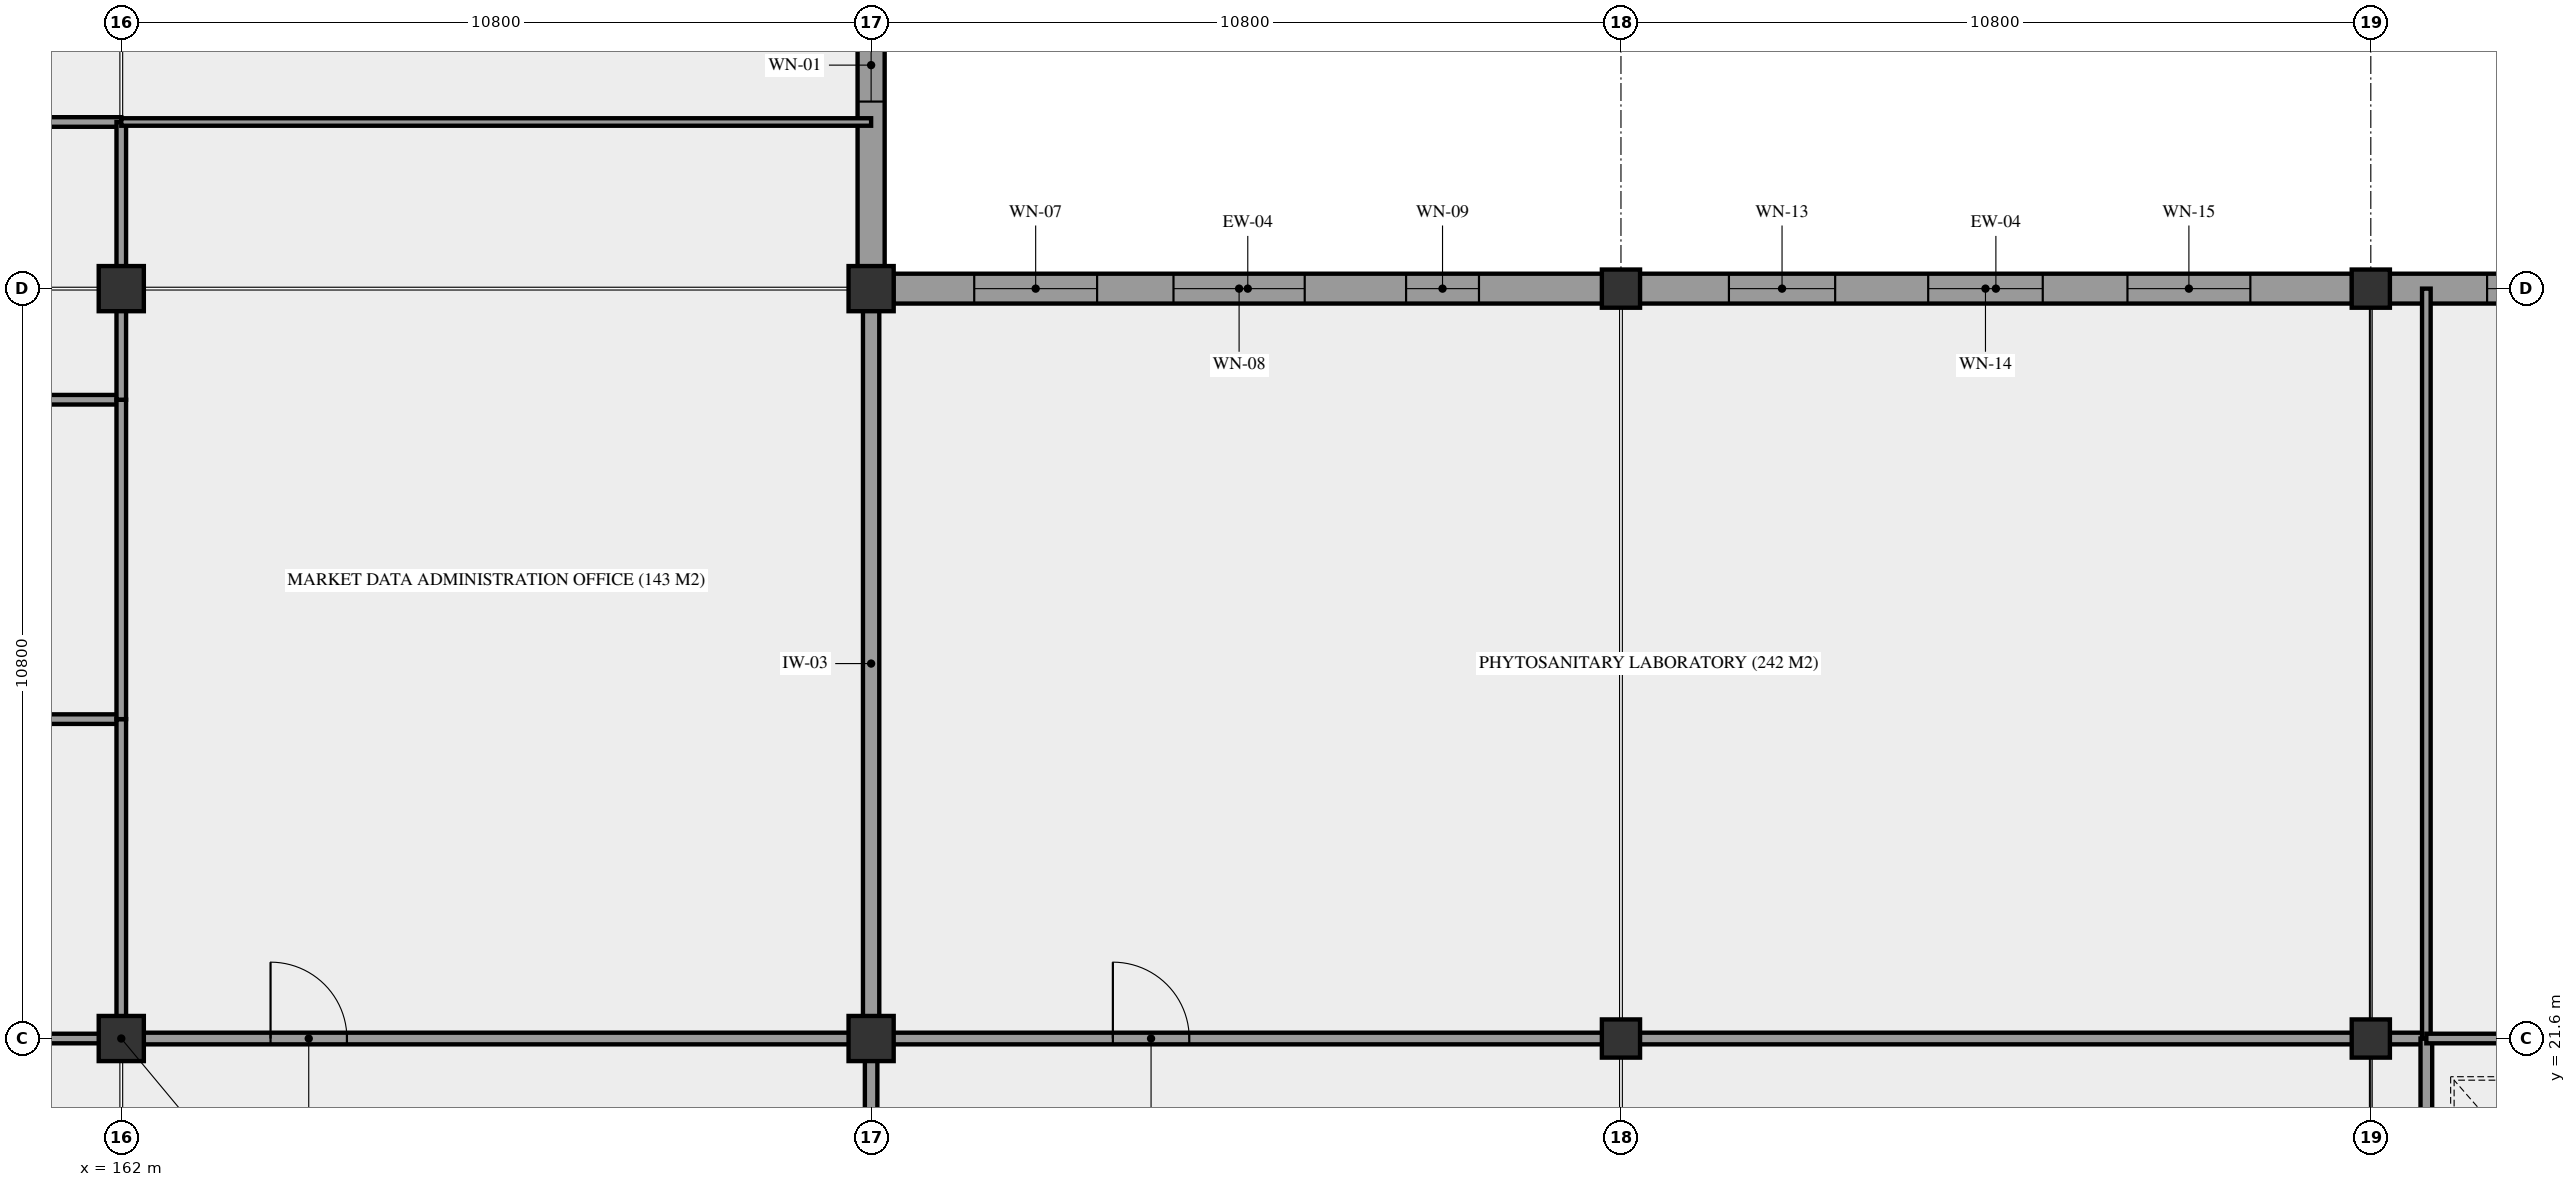
"""IFC4 building model, lengths in metres.
Left out: names, types, materials, properties, quantities, classifications, styles, units other than length and angle.
Written with IfcOpenShell. Run it as: python <this file> out.ifc"""

import sys

from ifc_helpers import new_model, si_unit, direction, frame, frame_2d, origin, origin_2d, place, context, subcontext, project, spatial, rectangle, extrude, element, fill, save


model = new_model("IFC4")
c1 = context("Model", 3, precision=1e-05, world=origin(), true_north=direction((0.0, 1.0)))
c2 = subcontext(c1, "Body", "Model", "MODEL_VIEW")
j1 = project(units=[si_unit("LENGTHUNIT", "METRE"), si_unit("PLANEANGLEUNIT", "RADIAN")], contexts=[c1])
p1 = place(None, origin())
s1 = spatial("IfcSite", under=j1, at=p1, CompositionType="ELEMENT")
p2 = place(p1, origin())
s2 = spatial("IfcBuilding", under=s1, at=p2, CompositionType="ELEMENT")
p3 = place(p2, frame((0.0, 0.0, 10.08)))
s3 = spatial("IfcBuildingStorey", under=s2, at=p3, CompositionType="ELEMENT", Elevation=10.08)
for number, where, z_axis, x_axis in (
    (1, (162.0, 21.6, 0.0), (0.0, 0.0, 1.0), (1.0, 0.0, 0.0)),
    (2, (162.0, 32.4, 0.0), (0.0, 0.0, 1.0), (1.0, 0.0, 0.0)),
    (3, (172.8, 21.6, 0.0), (0.0, 0.0, 1.0), (1.0, 0.0, 0.0)),
    (4, (172.8, 32.4, 0.0), (0.0, 0.0, 1.0), (1.0, 0.0, 0.0)),
):
    element("IfcColumn", number, at=place(p3, frame(where, z_axis=z_axis, x_axis=x_axis)), inside=s3, PredefinedType="COLUMN", context=c2, shape_type="SweptSolid", body=[
        extrude(rectangle(XDim=0.65, YDim=0.65, at=origin_2d()), origin(), (0.0, 0.0, 1.0), 4.68),
    ])
for number, where, z_axis, x_axis in (
    (5, (183.6, 21.6, 0.0), (0.0, 0.0, 1.0), (1.0, 0.0, 0.0)),
    (6, (183.6, 32.4, 0.0), (0.0, 0.0, 1.0), (1.0, 0.0, 0.0)),
    (7, (194.4, 21.6, 0.0), (0.0, 0.0, 1.0), (1.0, 0.0, 0.0)),
    (8, (194.4, 32.4, 0.0), (0.0, 0.0, 1.0), (1.0, 0.0, 0.0)),
):
    element("IfcColumn", number, at=place(p3, frame(where, z_axis=z_axis, x_axis=x_axis)), inside=s3, PredefinedType="COLUMN", context=c2, shape_type="SweptSolid", body=[
        extrude(rectangle(XDim=0.55, YDim=0.55, at=origin_2d()), origin(), (0.0, 0.0, 1.0), 4.68),
    ])
p4 = place(p3, frame((172.8, 32.72, 0.0), z_axis=(0.0, 0.0, 1.0), x_axis=(0.0, 1.0, 0.0)))
e9 = element("IfcWall", 9, at=p4, inside=s3, PredefinedType="STANDARD", context=c2, shape_type="SweptSolid", body=[
    extrude(rectangle(XDim=10.16, YDim=0.39, at=frame_2d((5.08, 0.0))), origin(), (0.0, 0.0, 1.0), 3.53),
])
p5 = place(p4, frame((2.374, 0.0, 0.95)))
e10 = element("IfcOpeningElement", 10, at=p5, cuts=e9, PredefinedType="OPENING", context=c2, shape_type="SweptSolid", body=[
    extrude(rectangle(XDim=1.05, YDim=0.9, at=frame_2d((0.525, 0.45))), frame((0.0, 0.205, 0.0), z_axis=(0.0, -1.0, 0.0), x_axis=(1.0, 0.0, 0.0)), (0.0, 0.0, 1.0), 0.41),
])
p6 = place(p4, frame((4.395, 0.0, 0.95)))
e11 = element("IfcOpeningElement", 11, at=p6, cuts=e9, PredefinedType="OPENING", context=c2, shape_type="SweptSolid", body=[
    extrude(rectangle(XDim=1.17, YDim=0.9, at=frame_2d((0.585, 0.45))), frame((0.0, 0.205, 0.0), z_axis=(0.0, -1.0, 0.0), x_axis=(1.0, 0.0, 0.0)), (0.0, 0.0, 1.0), 0.41),
])
p7 = place(p4, frame((7.265, 0.0, 0.95)))
e12 = element("IfcOpeningElement", 12, at=p7, cuts=e9, PredefinedType="OPENING", context=c2, shape_type="SweptSolid", body=[
    extrude(rectangle(XDim=1.29, YDim=0.9, at=frame_2d((0.645, 0.45))), frame((0.0, 0.205, 0.0), z_axis=(0.0, -1.0, 0.0), x_axis=(1.0, 0.0, 0.0)), (0.0, 0.0, 1.0), 0.41),
])
p8 = place(p3, frame((173.12, 32.4, 0.0), z_axis=(0.0, 0.0, 1.0), x_axis=(1.0, 0.0, 0.0)))
e13 = element("IfcWall", 13, at=p8, inside=s3, PredefinedType="STANDARD", context=c2, shape_type="SweptSolid", body=[
    extrude(rectangle(XDim=10.21, YDim=0.43, at=frame_2d((5.105, 0.0))), origin(), (0.0, 0.0, 1.0), 3.53),
])
p9 = place(p8, frame((1.165, 0.0, 0.95)))
e14 = element("IfcOpeningElement", 14, at=p9, cuts=e13, PredefinedType="OPENING", context=c2, shape_type="SweptSolid", body=[
    extrude(rectangle(XDim=1.77, YDim=0.9, at=frame_2d((0.885, 0.45))), frame((0.0, 0.225, 0.0), z_axis=(0.0, -1.0, 0.0), x_axis=(1.0, 0.0, 0.0)), (0.0, 0.0, 1.0), 0.45),
])
p10 = place(p8, frame((4.035, 0.0, 0.95)))
e15 = element("IfcOpeningElement", 15, at=p10, cuts=e13, PredefinedType="OPENING", context=c2, shape_type="SweptSolid", body=[
    extrude(rectangle(XDim=1.89, YDim=0.9, at=frame_2d((0.945, 0.45))), frame((0.0, 0.225, 0.0), z_axis=(0.0, -1.0, 0.0), x_axis=(1.0, 0.0, 0.0)), (0.0, 0.0, 1.0), 0.45),
])
p11 = place(p8, frame((7.385, 0.0, 0.95)))
e16 = element("IfcOpeningElement", 16, at=p11, cuts=e13, PredefinedType="OPENING", context=c2, shape_type="SweptSolid", body=[
    extrude(rectangle(XDim=1.05, YDim=1.05, at=frame_2d((0.525, 0.525))), frame((0.0, 0.225, 0.0), z_axis=(0.0, -1.0, 0.0), x_axis=(1.0, 0.0, 0.0)), (0.0, 0.0, 1.0), 0.45),
])
p12 = place(p3, frame((183.87, 32.4, 0.0), z_axis=(0.0, 0.0, 1.0), x_axis=(1.0, 0.0, 0.0)))
e17 = element("IfcWall", 17, at=p12, inside=s3, PredefinedType="STANDARD", context=c2, shape_type="SweptSolid", body=[
    extrude(rectangle(XDim=10.26, YDim=0.43, at=frame_2d((5.13, 0.0))), origin(), (0.0, 0.0, 1.0), 3.53),
])
p13 = place(p12, frame((1.285, 0.0, 0.95)))
e18 = element("IfcOpeningElement", 18, at=p13, cuts=e17, PredefinedType="OPENING", context=c2, shape_type="SweptSolid", body=[
    extrude(rectangle(XDim=1.53, YDim=1.05, at=frame_2d((0.765, 0.525))), frame((0.0, 0.225, 0.0), z_axis=(0.0, -1.0, 0.0), x_axis=(1.0, 0.0, 0.0)), (0.0, 0.0, 1.0), 0.45),
])
p14 = place(p12, frame((4.155, 0.0, 0.95)))
e19 = element("IfcOpeningElement", 19, at=p14, cuts=e17, PredefinedType="OPENING", context=c2, shape_type="SweptSolid", body=[
    extrude(rectangle(XDim=1.65, YDim=1.05, at=frame_2d((0.825, 0.525))), frame((0.0, 0.225, 0.0), z_axis=(0.0, -1.0, 0.0), x_axis=(1.0, 0.0, 0.0)), (0.0, 0.0, 1.0), 0.45),
])
p15 = place(p12, frame((7.025, 0.0, 0.95)))
e20 = element("IfcOpeningElement", 20, at=p15, cuts=e17, PredefinedType="OPENING", context=c2, shape_type="SweptSolid", body=[
    extrude(rectangle(XDim=1.77, YDim=1.05, at=frame_2d((0.885, 0.525))), frame((0.0, 0.225, 0.0), z_axis=(0.0, -1.0, 0.0), x_axis=(1.0, 0.0, 0.0)), (0.0, 0.0, 1.0), 0.45),
])
p16 = place(p3, frame((194.67, 32.4, 0.0), z_axis=(0.0, 0.0, 1.0), x_axis=(1.0, 0.0, 0.0)))
e21 = element("IfcWall", 21, at=p16, inside=s3, PredefinedType="STANDARD", context=c2, shape_type="SweptSolid", body=[
    extrude(rectangle(XDim=10.26, YDim=0.43, at=frame_2d((5.13, 0.0))), origin(), (0.0, 0.0, 1.0), 3.53),
])
p17 = place(p16, frame((1.405, 0.0, 0.95)))
e22 = element("IfcOpeningElement", 22, at=p17, cuts=e21, PredefinedType="OPENING", context=c2, shape_type="SweptSolid", body=[
    extrude(rectangle(XDim=1.29, YDim=1.2, at=frame_2d((0.645, 0.6))), frame((0.0, 0.225, 0.0), z_axis=(0.0, -1.0, 0.0), x_axis=(1.0, 0.0, 0.0)), (0.0, 0.0, 1.0), 0.45),
])
p18 = place(p16, frame((4.275, 0.0, 0.95)))
e23 = element("IfcOpeningElement", 23, at=p18, cuts=e21, PredefinedType="OPENING", context=c2, shape_type="SweptSolid", body=[
    extrude(rectangle(XDim=1.41, YDim=1.2, at=frame_2d((0.705, 0.6))), frame((0.0, 0.225, 0.0), z_axis=(0.0, -1.0, 0.0), x_axis=(1.0, 0.0, 0.0)), (0.0, 0.0, 1.0), 0.45),
])
p19 = place(p16, frame((7.145, 0.0, 0.95)))
e24 = element("IfcOpeningElement", 24, at=p19, cuts=e21, PredefinedType="OPENING", context=c2, shape_type="SweptSolid", body=[
    extrude(rectangle(XDim=1.53, YDim=1.2, at=frame_2d((0.765, 0.6))), frame((0.0, 0.225, 0.0), z_axis=(0.0, -1.0, 0.0), x_axis=(1.0, 0.0, 0.0)), (0.0, 0.0, 1.0), 0.45),
])
p20 = place(p3, frame((172.8, 17.2, 0.0), z_axis=(0.0, 0.0, 1.0), x_axis=(0.0, 1.0, 0.0)))
e25 = element("IfcWall", 25, at=p20, inside=s3, PredefinedType="PARTITIONING", context=c2, shape_type="SweptSolid", body=[
    extrude(rectangle(XDim=4.4, YDim=0.18, at=frame_2d((2.2, 0.0))), origin(), (0.0, 0.0, 1.0), 3.23),
])
p21 = place(p20, frame((0.3, 0.0, 0.0)))
e26 = element("IfcOpeningElement", 26, at=p21, cuts=e25, PredefinedType="OPENING", context=c2, shape_type="SweptSolid", body=[
    extrude(rectangle(XDim=1.6, YDim=2.2, at=frame_2d((0.8, 1.1))), frame((0.0, 0.1, 0.0), z_axis=(0.0, -1.0, 0.0), x_axis=(1.0, 0.0, 0.0)), (0.0, 0.0, 1.0), 0.2),
])
p22 = place(p3, frame((155.0, 21.6, 0.0), z_axis=(0.0, 0.0, 1.0), x_axis=(1.0, 0.0, 0.0)))
e27 = element("IfcWall", 27, at=p22, inside=s3, PredefinedType="PARTITIONING", context=c2, shape_type="SweptSolid", body=[
    extrude(rectangle(XDim=7.0, YDim=0.138, at=frame_2d((3.5, 0.0))), origin(), (0.0, 0.0, 1.0), 3.23),
])
p23 = place(p22, frame((0.38, 0.0, 0.0)))
e28 = element("IfcOpeningElement", 28, at=p23, cuts=e27, PredefinedType="OPENING", context=c2, shape_type="SweptSolid", body=[
    extrude(rectangle(XDim=0.92, YDim=2.14, at=frame_2d((0.46, 1.07))), frame((0.0, 0.079, 0.0), z_axis=(0.0, -1.0, 0.0), x_axis=(1.0, 0.0, 0.0)), (0.0, 0.0, 1.0), 0.158),
])
p24 = place(p3, frame((162.0, 21.6, 0.0), z_axis=(0.0, 0.0, 1.0), x_axis=(1.0, 0.0, 0.0)))
e29 = element("IfcWall", 29, at=p24, inside=s3, PredefinedType="PARTITIONING", context=c2, shape_type="SweptSolid", body=[
    extrude(rectangle(XDim=10.8, YDim=0.168, at=frame_2d((5.4, 0.0))), origin(), (0.0, 0.0, 1.0), 3.23),
])
p25 = place(p24, frame((2.15, 0.0, 0.0)))
e30 = element("IfcOpeningElement", 30, at=p25, cuts=e29, PredefinedType="OPENING", context=c2, shape_type="SweptSolid", body=[
    extrude(rectangle(XDim=1.1, YDim=2.2, at=frame_2d((0.55, 1.1))), frame((0.0, 0.094, 0.0), z_axis=(0.0, -1.0, 0.0), x_axis=(1.0, 0.0, 0.0)), (0.0, 0.0, 1.0), 0.188),
])
p26 = place(p3, frame((172.8, 21.6, 0.0), z_axis=(0.0, 0.0, 1.0), x_axis=(1.0, 0.0, 0.0)))
e31 = element("IfcWall", 31, at=p26, inside=s3, PredefinedType="PARTITIONING", context=c2, shape_type="SweptSolid", body=[
    extrude(rectangle(XDim=22.4, YDim=0.168, at=frame_2d((11.2, 0.0))), origin(), (0.0, 0.0, 1.0), 3.23),
])
p27 = place(p26, frame((3.482, 0.0, 0.0)))
e32 = element("IfcOpeningElement", 32, at=p27, cuts=e31, PredefinedType="OPENING", context=c2, shape_type="SweptSolid", body=[
    extrude(rectangle(XDim=1.1, YDim=2.2, at=frame_2d((0.55, 1.1))), frame((0.0, 0.094, 0.0), z_axis=(0.0, -1.0, 0.0), x_axis=(1.0, 0.0, 0.0)), (0.0, 0.0, 1.0), 0.188),
])
for number, where, z_axis, x_axis in (
    (33, (155.0, 26.2, 0.0), (0.0, 0.0, 1.0), (1.0, 0.0, 0.0)),
    (34, (155.0, 30.8, 0.0), (0.0, 0.0, 1.0), (1.0, 0.0, 0.0)),
    (35, (155.0, 34.8, 0.0), (0.0, 0.0, 1.0), (1.0, 0.0, 0.0)),
):
    element("IfcWall", number, at=place(p3, frame(where, z_axis=z_axis, x_axis=x_axis)), inside=s3, PredefinedType="PARTITIONING", context=c2, shape_type="SweptSolid", body=[
        extrude(rectangle(XDim=7.0, YDim=0.138, at=frame_2d((3.5, 0.0))), origin(), (0.0, 0.0, 1.0), 3.23),
    ])
p28 = place(p3, frame((162.0, 21.6, 0.0), z_axis=(0.0, 0.0, 1.0), x_axis=(0.0, 1.0, 0.0)))
e36 = element("IfcWall", 36, at=p28, inside=s3, PredefinedType="PARTITIONING", context=c2, shape_type="SweptSolid", body=[
    extrude(rectangle(XDim=4.6, YDim=0.138, at=frame_2d((2.3, 0.0))), origin(), (0.0, 0.0, 1.0), 3.23),
])
p29 = place(p3, frame((162.0, 26.2, 0.0), z_axis=(0.0, 0.0, 1.0), x_axis=(0.0, 1.0, 0.0)))
e37 = element("IfcWall", 37, at=p29, inside=s3, PredefinedType="PARTITIONING", context=c2, shape_type="SweptSolid", body=[
    extrude(rectangle(XDim=4.6, YDim=0.138, at=frame_2d((2.3, 0.0))), origin(), (0.0, 0.0, 1.0), 3.23),
])
p30 = place(p3, frame((162.0, 30.8, 0.0), z_axis=(0.0, 0.0, 1.0), x_axis=(0.0, 1.0, 0.0)))
e38 = element("IfcWall", 38, at=p30, inside=s3, PredefinedType="PARTITIONING", context=c2, shape_type="SweptSolid", body=[
    extrude(rectangle(XDim=4.0, YDim=0.138, at=frame_2d((2.0, 0.0))), origin(), (0.0, 0.0, 1.0), 3.23),
])
p31 = place(p3, frame((162.0, 34.8, 0.0), z_axis=(0.0, 0.0, 1.0), x_axis=(1.0, 0.0, 0.0)))
e39 = element("IfcWall", 39, at=p31, inside=s3, PredefinedType="PARTITIONING", context=c2, shape_type="SweptSolid", body=[
    extrude(rectangle(XDim=10.8, YDim=0.108, at=frame_2d((5.4, 0.0))), origin(), (0.0, 0.0, 1.0), 3.23),
])
p32 = place(p3, frame((172.8, 21.6, 0.0), z_axis=(0.0, 0.0, 1.0), x_axis=(0.0, 1.0, 0.0)))
e40 = element("IfcWall", 40, at=p32, inside=s3, PredefinedType="PARTITIONING", context=c2, shape_type="SweptSolid", body=[
    extrude(rectangle(XDim=10.8, YDim=0.235, at=frame_2d((5.4, 0.0))), origin(), (0.0, 0.0, 1.0), 3.23),
])
p33 = place(p3, frame((195.2, 17.2, 0.0), z_axis=(0.0, 0.0, 1.0), x_axis=(0.0, 1.0, 0.0)))
e41 = element("IfcWall", 41, at=p33, inside=s3, PredefinedType="PARTITIONING", context=c2, shape_type="SweptSolid", body=[
    extrude(rectangle(XDim=4.4, YDim=0.168, at=frame_2d((2.2, 0.0))), origin(), (0.0, 0.0, 1.0), 3.23),
])
p34 = place(p3, frame((195.2, 21.6, 0.0), z_axis=(0.0, 0.0, 1.0), x_axis=(0.0, 1.0, 0.0)))
e42 = element("IfcWall", 42, at=p34, inside=s3, PredefinedType="PARTITIONING", context=c2, shape_type="SweptSolid", body=[
    extrude(rectangle(XDim=10.8, YDim=0.124, at=frame_2d((5.4, 0.0))), origin(), (0.0, 0.0, 1.0), 3.23),
])
p35 = place(p3, frame((195.2, 21.6, 0.0), z_axis=(0.0, 0.0, 1.0), x_axis=(1.0, 0.0, 0.0)))
e43 = element("IfcWall", 43, at=p35, inside=s3, PredefinedType="PARTITIONING", context=c2, shape_type="SweptSolid", body=[
    extrude(rectangle(XDim=9.2, YDim=0.138, at=frame_2d((4.6, 0.0))), origin(), (0.0, 0.0, 1.0), 3.23),
])
p36 = place(p5, frame((1.05, 0.0, 0.0), z_axis=(0.0, 0.0, 1.0), x_axis=(-1.0, 0.0, 0.0)))
e44 = element("IfcWindow", 44, at=p36, inside=s3, PartitioningType="SINGLE_PANEL", PredefinedType="WINDOW", context=c2, shape_type="SweptSolid", body=[
    extrude(rectangle(XDim=1.05, YDim=0.9, at=frame_2d((0.525, 0.45))), frame((0.0, 0.03, 0.0), z_axis=(0.0, -1.0, 0.0), x_axis=(1.0, 0.0, 0.0)), (0.0, 0.0, 1.0), 0.06),
])
fill(e10, e44)
p37 = place(p9, origin())
e45 = element("IfcWindow", 45, at=p37, inside=s3, PartitioningType="SINGLE_PANEL", PredefinedType="WINDOW", context=c2, shape_type="SweptSolid", body=[
    extrude(rectangle(XDim=1.77, YDim=0.9, at=frame_2d((0.885, 0.45))), frame((0.0, 0.03, 0.0), z_axis=(0.0, -1.0, 0.0), x_axis=(1.0, 0.0, 0.0)), (0.0, 0.0, 1.0), 0.06),
])
fill(e14, e45)
p38 = place(p10, origin())
e46 = element("IfcWindow", 46, at=p38, inside=s3, PartitioningType="SINGLE_PANEL", PredefinedType="WINDOW", context=c2, shape_type="SweptSolid", body=[
    extrude(rectangle(XDim=1.89, YDim=0.9, at=frame_2d((0.945, 0.45))), frame((0.0, 0.03, 0.0), z_axis=(0.0, -1.0, 0.0), x_axis=(1.0, 0.0, 0.0)), (0.0, 0.0, 1.0), 0.06),
])
fill(e15, e46)
p39 = place(p11, origin())
e47 = element("IfcWindow", 47, at=p39, inside=s3, PartitioningType="SINGLE_PANEL", PredefinedType="WINDOW", context=c2, shape_type="SweptSolid", body=[
    extrude(rectangle(XDim=1.05, YDim=1.05, at=frame_2d((0.525, 0.525))), frame((0.0, 0.03, 0.0), z_axis=(0.0, -1.0, 0.0), x_axis=(1.0, 0.0, 0.0)), (0.0, 0.0, 1.0), 0.06),
])
fill(e16, e47)
p40 = place(p13, origin())
e48 = element("IfcWindow", 48, at=p40, inside=s3, PartitioningType="SINGLE_PANEL", PredefinedType="WINDOW", context=c2, shape_type="SweptSolid", body=[
    extrude(rectangle(XDim=1.53, YDim=1.05, at=frame_2d((0.765, 0.525))), frame((0.0, 0.03, 0.0), z_axis=(0.0, -1.0, 0.0), x_axis=(1.0, 0.0, 0.0)), (0.0, 0.0, 1.0), 0.06),
])
fill(e18, e48)
p41 = place(p14, origin())
e49 = element("IfcWindow", 49, at=p41, inside=s3, PartitioningType="SINGLE_PANEL", PredefinedType="WINDOW", context=c2, shape_type="SweptSolid", body=[
    extrude(rectangle(XDim=1.65, YDim=1.05, at=frame_2d((0.825, 0.525))), frame((0.0, 0.03, 0.0), z_axis=(0.0, -1.0, 0.0), x_axis=(1.0, 0.0, 0.0)), (0.0, 0.0, 1.0), 0.06),
])
fill(e19, e49)
p42 = place(p15, origin())
e50 = element("IfcWindow", 50, at=p42, inside=s3, PartitioningType="SINGLE_PANEL", PredefinedType="WINDOW", context=c2, shape_type="SweptSolid", body=[
    extrude(rectangle(XDim=1.77, YDim=1.05, at=frame_2d((0.885, 0.525))), frame((0.0, 0.03, 0.0), z_axis=(0.0, -1.0, 0.0), x_axis=(1.0, 0.0, 0.0)), (0.0, 0.0, 1.0), 0.06),
])
fill(e20, e50)
p43 = place(p17, origin())
e51 = element("IfcWindow", 51, at=p43, inside=s3, PartitioningType="SINGLE_PANEL", PredefinedType="WINDOW", context=c2, shape_type="SweptSolid", body=[
    extrude(rectangle(XDim=1.29, YDim=1.2, at=frame_2d((0.645, 0.6))), frame((0.0, 0.03, 0.0), z_axis=(0.0, -1.0, 0.0), x_axis=(1.0, 0.0, 0.0)), (0.0, 0.0, 1.0), 0.06),
])
fill(e22, e51)
p44 = place(p25, origin())
e52 = element("IfcDoor", 52, at=p44, inside=s3, OperationType="SINGLE_SWING_LEFT", PredefinedType="DOOR", context=c2, shape_type="SweptSolid", body=[
    extrude(rectangle(XDim=1.1, YDim=2.2, at=frame_2d((0.55, 1.1))), frame((0.0, 0.025, 0.0), z_axis=(0.0, -1.0, 0.0), x_axis=(1.0, 0.0, 0.0)), (0.0, 0.0, 1.0), 0.05),
])
fill(e30, e52)
p45 = place(p27, origin())
e53 = element("IfcDoor", 53, at=p45, inside=s3, OperationType="SINGLE_SWING_LEFT", PredefinedType="DOOR", context=c2, shape_type="SweptSolid", body=[
    extrude(rectangle(XDim=1.1, YDim=2.2, at=frame_2d((0.55, 1.1))), frame((0.0, 0.025, 0.0), z_axis=(0.0, -1.0, 0.0), x_axis=(1.0, 0.0, 0.0)), (0.0, 0.0, 1.0), 0.05),
])
fill(e32, e53)
save(model, sys.argv[1])
